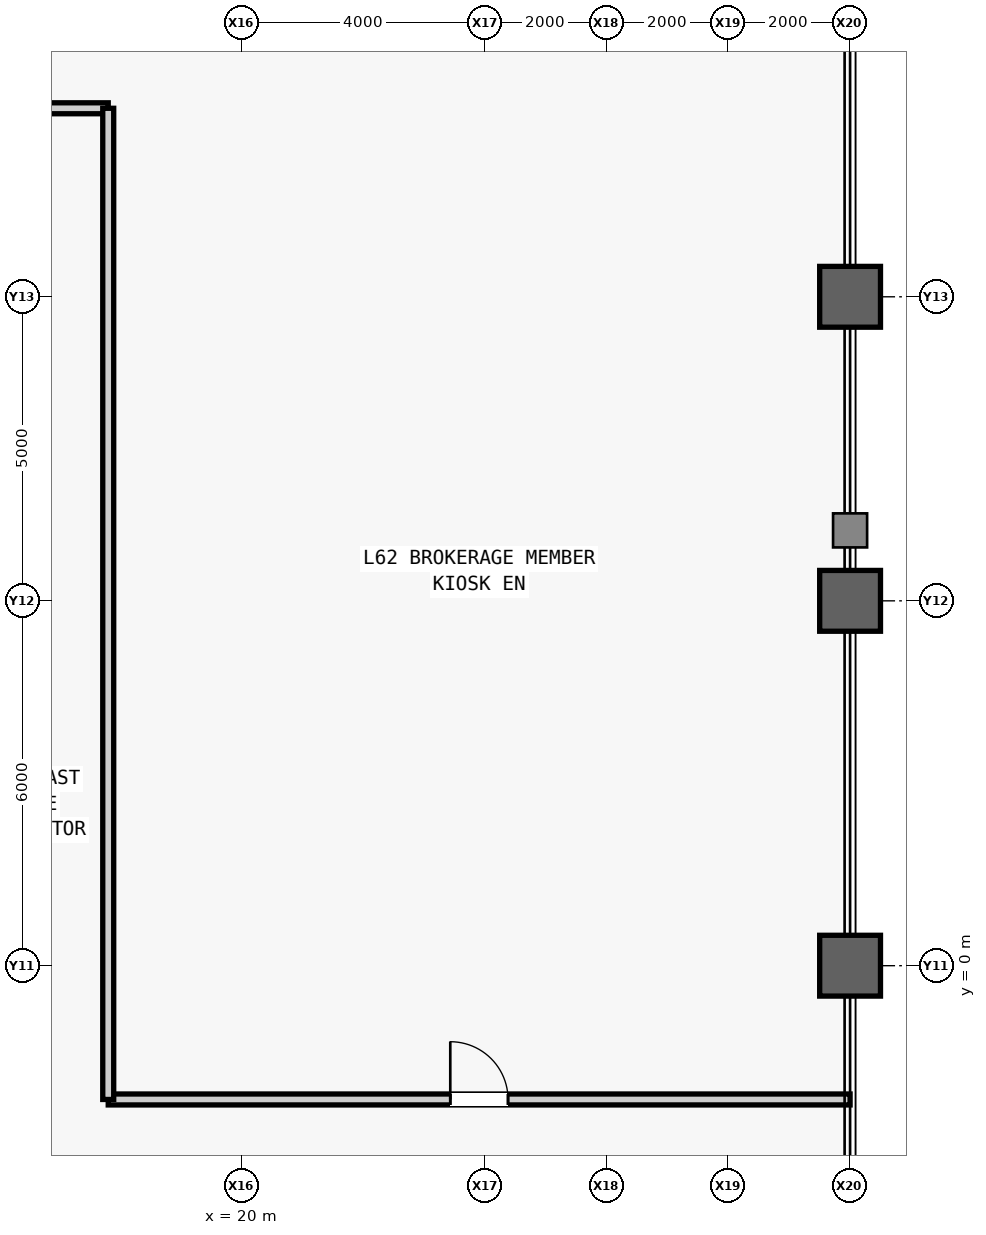
"""IFC4 building model, lengths in metres.
Left out: names, types, materials, properties, quantities, classifications, styles, units other than length and angle.
Written with IfcOpenShell. Run it as: python <this file> out.ifc"""

import sys

from ifc_helpers import new_model, si_unit, direction, frame, frame_2d, origin, origin_2d, place, context, subcontext, project, spatial, rectangle, hollow_rectangle, extrude, source, transform, mapped, element, fill, save


model = new_model("IFC4")
c1 = context("Model", 3, precision=1e-05, world=origin(), true_north=direction((0.0, 1.0)))
c2 = subcontext(c1, "Body", "Model", "MODEL_VIEW")
j1 = project(units=[si_unit("LENGTHUNIT", "METRE"), si_unit("PLANEANGLEUNIT", "RADIAN")], contexts=[c1])
p1 = place(None, origin())
s1 = spatial("IfcSite", under=j1, at=p1, CompositionType="ELEMENT")
p2 = place(p1, origin())
s2 = spatial("IfcBuilding", under=s1, at=p2, CompositionType="ELEMENT")
p3 = place(p2, frame((0.0, 0.0, 263.1)))
s3 = spatial("IfcBuildingStorey", under=s2, at=p3, CompositionType="ELEMENT", Elevation=263.1)
m1 = source(origin(), c2, "Body", "SweptSolid", [
    extrude(hollow_rectangle(XDim=1.0, YDim=1.0, WallThickness=0.055, at=origin_2d()), origin(), (0.0, 0.0, 1.0), 5.2),
])
for number, where, z_axis, x_axis in (
    (1, (30.0, 0.0, 0.0), (0.0, 0.0, 1.0), (1.0, 0.0, 0.0)),
    (2, (30.0, 6.0, 0.0), (0.0, 0.0, 1.0), (1.0, 0.0, 0.0)),
    (3, (30.0, 11.0, 0.0), (0.0, 0.0, 1.0), (1.0, 0.0, 0.0)),
):
    element("IfcColumn", number, at=place(p3, frame(where, z_axis=z_axis, x_axis=x_axis)), inside=s3, PredefinedType="COLUMN", context=c2, shape_type="MappedRepresentation", body=[
        mapped(m1, transform((0.0, 0.0, 0.0), scale=1.0)),
    ])
m2 = source(origin(), c2, "Body", "SweptSolid", [
    extrude(rectangle(XDim=2.45, YDim=0.18, at=frame_2d((1.225, 0.0))), origin(), (0.0, 0.0, 1.0), 4.6),
])
p4 = place(p3, frame((15.35, 14.1, 0.0), z_axis=(0.0, 0.0, 1.0), x_axis=(1.0, 0.0, 0.0)))
e4 = element("IfcWall", 4, at=p4, inside=s3, PredefinedType="PARTITIONING", context=c2, shape_type="MappedRepresentation", body=[
    mapped(m2, transform((0.0, 0.0, 0.0), scale=1.0)),
])
m3 = source(origin(), c2, "Body", "SweptSolid", [
    extrude(rectangle(XDim=12.2, YDim=0.18, at=frame_2d((6.1, 0.0))), origin(), (0.0, 0.0, 1.0), 4.6),
])
p5 = place(p3, frame((17.8, -2.2, 0.0), z_axis=(0.0, 0.0, 1.0), x_axis=(1.0, 0.0, 0.0)))
e5 = element("IfcWall", 5, at=p5, inside=s3, PredefinedType="PARTITIONING", context=c2, shape_type="MappedRepresentation", body=[
    mapped(m3, transform((0.0, 0.0, 0.0), scale=1.0)),
])
m4 = source(origin(), c2, "Body", "SweptSolid", [
    extrude(rectangle(XDim=0.95, YDim=2.15, at=frame_2d((0.475, 1.075))), frame((0.0, 0.1, 0.0), z_axis=(0.0, -1.0, 0.0), x_axis=(1.0, 0.0, 0.0)), (0.0, 0.0, 1.0), 0.2),
])
p6 = place(p5, frame((5.625, 0.0, 0.0)))
e6 = element("IfcOpeningElement", 6, at=p6, cuts=e5, PredefinedType="OPENING", context=c2, shape_type="MappedRepresentation", body=[
    mapped(m4, transform((0.0, 0.0, 0.0), scale=1.0)),
])
m5 = source(origin(), c2, "Body", "SweptSolid", [
    extrude(rectangle(XDim=16.3, YDim=0.18, at=frame_2d((8.15, 0.0))), origin(), (0.0, 0.0, 1.0), 4.6),
])
p7 = place(p3, frame((17.8, -2.2, 0.0), z_axis=(0.0, 0.0, 1.0), x_axis=(0.0, 1.0, 0.0)))
e7 = element("IfcWall", 7, at=p7, inside=s3, PredefinedType="PARTITIONING", context=c2, shape_type="MappedRepresentation", body=[
    mapped(m5, transform((0.0, 0.0, 0.0), scale=1.0)),
])
m6 = source(origin(), c2, "Body", "SweptSolid", [
    extrude(rectangle(XDim=0.95, YDim=2.15, at=frame_2d((0.475, 1.075))), frame((0.0, 0.025, 0.0), z_axis=(0.0, -1.0, 0.0), x_axis=(1.0, 0.0, 0.0)), (0.0, 0.0, 1.0), 0.05),
])
p8 = place(p6, origin())
e8 = element("IfcDoor", 8, at=p8, inside=s3, OperationType="SINGLE_SWING_LEFT", PredefinedType="DOOR", context=c2, shape_type="MappedRepresentation", body=[
    mapped(m6, transform((0.0, 0.0, 0.0), scale=1.0)),
])
fill(e6, e8)
save(model, sys.argv[1])
